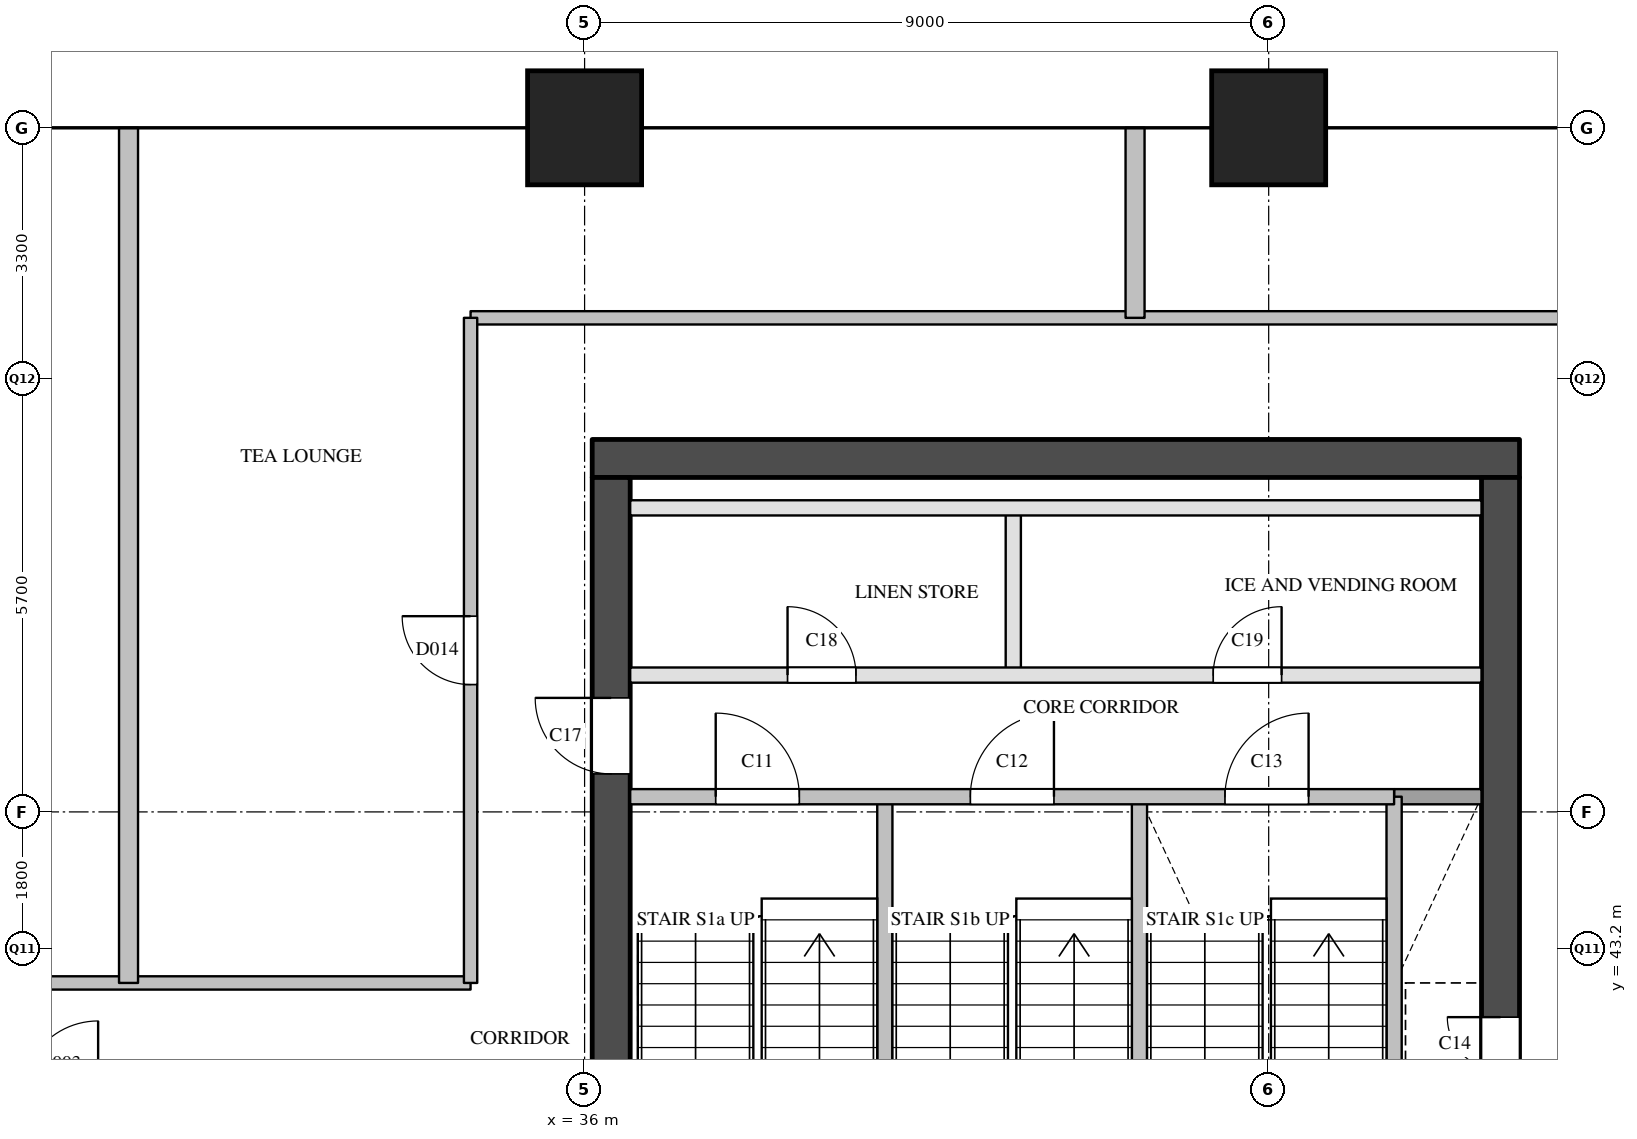
"""IFC4 building model, lengths in metres.
Left out: names, types, materials, properties, quantities, classifications, styles, units other than length and angle.
Written with IfcOpenShell. Run it as: python <this file> out.ifc"""

import sys

from ifc_helpers import new_model, si_unit, direction, frame, frame_2d, origin, origin_2d, place, context, subcontext, project, spatial, rectangle, extrude, element, fill, save


model = new_model("IFC4")
c1 = context("Model", 3, precision=1e-05, world=origin(), true_north=direction((0.0, 1.0)))
c2 = subcontext(c1, "Body", "Model", "MODEL_VIEW")
j1 = project(units=[si_unit("LENGTHUNIT", "METRE"), si_unit("PLANEANGLEUNIT", "RADIAN")], contexts=[c1])
p1 = place(None, origin())
s1 = spatial("IfcSite", under=j1, at=p1, CompositionType="ELEMENT")
p2 = place(p1, origin())
s2 = spatial("IfcBuilding", under=s1, at=p2, CompositionType="ELEMENT")
p3 = place(p2, frame((0.0, 0.0, 150.5)))
s3 = spatial("IfcBuildingStorey", under=s2, at=p3, CompositionType="ELEMENT", Elevation=150.5)
for number, where, z_axis, x_axis in (
    (1, (36.0, 54.0, 0.0), (0.0, 0.0, 1.0), (1.0, 0.0, 0.0)),
    (2, (45.0, 54.0, 0.0), (0.0, 0.0, 1.0), (1.0, 0.0, 0.0)),
):
    element("IfcColumn", number, at=place(p3, frame(where, z_axis=z_axis, x_axis=x_axis)), inside=s3, PredefinedType="COLUMN", context=c2, shape_type="SweptSolid", body=[
        extrude(rectangle(XDim=1.5, YDim=1.5, at=origin_2d()), origin(), (0.0, 0.0, 1.0), 3.9),
    ])
p4 = place(p3, frame((36.1, 49.65, 0.0), z_axis=(0.0, 0.0, 1.0), x_axis=(1.0, 0.0, 0.0)))
e3 = element("IfcWall", 3, at=p4, inside=s3, PredefinedType="SHEAR", context=c2, shape_type="SweptSolid", body=[
    extrude(rectangle(XDim=12.2, YDim=0.5, at=frame_2d((6.1, 0.0))), origin(), (0.0, 0.0, 1.0), 3.6),
])
p5 = place(p3, frame((36.35, 29.1, 0.0), z_axis=(0.0, 0.0, 1.0), x_axis=(0.0, 1.0, 0.0)))
e4 = element("IfcWall", 4, at=p5, inside=s3, PredefinedType="SHEAR", context=c2, shape_type="SweptSolid", body=[
    extrude(rectangle(XDim=20.3, YDim=0.5, at=frame_2d((10.15, 0.0))), origin(), (0.0, 0.0, 1.0), 3.6),
])
p6 = place(p5, frame((3.6, 0.0, 0.0)))
e5 = element("IfcOpeningElement", 5, at=p6, cuts=e4, PredefinedType="OPENING", context=c2, shape_type="SweptSolid", body=[
    extrude(rectangle(XDim=1.8, YDim=2.1, at=frame_2d((0.9, 1.05))), frame((0.0, 0.26, 0.0), z_axis=(0.0, -1.0, 0.0), x_axis=(1.0, 0.0, 0.0)), (0.0, 0.0, 1.0), 0.52),
])
p7 = place(p5, frame((16.4, 0.0, 0.0)))
e6 = element("IfcOpeningElement", 6, at=p7, cuts=e4, PredefinedType="OPENING", context=c2, shape_type="SweptSolid", body=[
    extrude(rectangle(XDim=1.0, YDim=2.1, at=frame_2d((0.5, 1.05))), frame((0.0, 0.26, 0.0), z_axis=(0.0, -1.0, 0.0), x_axis=(1.0, 0.0, 0.0)), (0.0, 0.0, 1.0), 0.52),
])
p8 = place(p3, frame((48.05, 29.1, 0.0), z_axis=(0.0, 0.0, 1.0), x_axis=(0.0, 1.0, 0.0)))
e7 = element("IfcWall", 7, at=p8, inside=s3, PredefinedType="SHEAR", context=c2, shape_type="SweptSolid", body=[
    extrude(rectangle(XDim=20.3, YDim=0.5, at=frame_2d((10.15, 0.0))), origin(), (0.0, 0.0, 1.0), 3.6),
])
p9 = place(p8, frame((12.5, 0.0, 0.0)))
e8 = element("IfcOpeningElement", 8, at=p9, cuts=e7, PredefinedType="OPENING", context=c2, shape_type="SweptSolid", body=[
    extrude(rectangle(XDim=0.7, YDim=2.1, at=frame_2d((0.35, 1.05))), frame((0.0, 0.26, 0.0), z_axis=(0.0, -1.0, 0.0), x_axis=(1.0, 0.0, 0.0)), (0.0, 0.0, 1.0), 0.52),
])
p10 = place(p8, frame((3.9, 0.0, 0.0)))
e9 = element("IfcOpeningElement", 9, at=p10, cuts=e7, PredefinedType="OPENING", context=c2, shape_type="SweptSolid", body=[
    extrude(rectangle(XDim=1.8, YDim=2.1, at=frame_2d((0.9, 1.05))), frame((0.0, 0.26, 0.0), z_axis=(0.0, -1.0, 0.0), x_axis=(1.0, 0.0, 0.0)), (0.0, 0.0, 1.0), 0.52),
])
p11 = place(p3, frame((39.95, 40.78, 0.0), z_axis=(0.0, 0.0, 1.0), x_axis=(0.0, 1.0, 0.0)))
e10 = element("IfcWall", 10, at=p11, inside=s3, PredefinedType="SOLIDWALL", context=c2, shape_type="SweptSolid", body=[
    extrude(rectangle(XDim=4.42, YDim=0.2, at=frame_2d((2.21, 0.0))), origin(), (0.0, 0.0, 1.0), 3.6),
])
p12 = place(p3, frame((41.64, 46.8, 0.0), z_axis=(0.0, 0.0, 1.0), x_axis=(0.0, 1.0, 0.0)))
e11 = element("IfcWall", 11, at=p12, inside=s3, PredefinedType="PARTITIONING", context=c2, shape_type="SweptSolid", body=[
    extrude(rectangle(XDim=2.2, YDim=0.2, at=frame_2d((1.1, 0.0))), origin(), (0.0, 0.0, 1.0), 3.6),
])
for number, where, z_axis, x_axis in (
    (12, (43.3, 40.78, 0.0), (0.0, 0.0, 1.0), (0.0, 1.0, 0.0)),
    (13, (46.65, 40.78, 0.0), (0.0, 0.0, 1.0), (0.0, 1.0, 0.0)),
):
    element("IfcWall", number, at=place(p3, frame(where, z_axis=z_axis, x_axis=x_axis)), inside=s3, PredefinedType="SOLIDWALL", context=c2, shape_type="SweptSolid", body=[
        extrude(rectangle(XDim=4.42, YDim=0.2, at=frame_2d((2.21, 0.0))), origin(), (0.0, 0.0, 1.0), 3.6),
    ])
p13 = place(p3, frame((46.65, 45.2, 0.0), z_axis=(0.0, 0.0, 1.0), x_axis=(1.0, 0.0, 0.0)))
e14 = element("IfcWall", 14, at=p13, inside=s3, PredefinedType="SOLIDWALL", context=c2, shape_type="SweptSolid", body=[
    extrude(rectangle(XDim=1.15, YDim=0.2, at=frame_2d((0.575, 0.0))), origin(), (0.0, 0.0, 1.0), 3.6),
])
p14 = place(p3, frame((36.6, 45.2, 0.0), z_axis=(0.0, 0.0, 1.0), x_axis=(1.0, 0.0, 0.0)))
e15 = element("IfcWall", 15, at=p14, inside=s3, PredefinedType="SOLIDWALL", context=c2, shape_type="SweptSolid", body=[
    extrude(rectangle(XDim=10.05, YDim=0.2, at=frame_2d((5.025, 0.0))), origin(), (0.0, 0.0, 1.0), 3.6),
])
p15 = place(p14, frame((1.125, 0.0, 0.0)))
e16 = element("IfcOpeningElement", 16, at=p15, cuts=e15, PredefinedType="OPENING", context=c2, shape_type="SweptSolid", body=[
    extrude(rectangle(XDim=1.1, YDim=2.1, at=frame_2d((0.55, 1.05))), frame((0.0, 0.11, 0.0), z_axis=(0.0, -1.0, 0.0), x_axis=(1.0, 0.0, 0.0)), (0.0, 0.0, 1.0), 0.22),
])
p16 = place(p14, frame((4.475, 0.0, 0.0)))
e17 = element("IfcOpeningElement", 17, at=p16, cuts=e15, PredefinedType="OPENING", context=c2, shape_type="SweptSolid", body=[
    extrude(rectangle(XDim=1.1, YDim=2.1, at=frame_2d((0.55, 1.05))), frame((0.0, 0.11, 0.0), z_axis=(0.0, -1.0, 0.0), x_axis=(1.0, 0.0, 0.0)), (0.0, 0.0, 1.0), 0.22),
])
p17 = place(p14, frame((7.825, 0.0, 0.0)))
e18 = element("IfcOpeningElement", 18, at=p17, cuts=e15, PredefinedType="OPENING", context=c2, shape_type="SweptSolid", body=[
    extrude(rectangle(XDim=1.1, YDim=2.1, at=frame_2d((0.55, 1.05))), frame((0.0, 0.11, 0.0), z_axis=(0.0, -1.0, 0.0), x_axis=(1.0, 0.0, 0.0)), (0.0, 0.0, 1.0), 0.22),
])
p18 = place(p3, frame((36.6, 46.8, 0.0), z_axis=(0.0, 0.0, 1.0), x_axis=(1.0, 0.0, 0.0)))
e19 = element("IfcWall", 19, at=p18, inside=s3, PredefinedType="PARTITIONING", context=c2, shape_type="SweptSolid", body=[
    extrude(rectangle(XDim=11.2, YDim=0.2, at=frame_2d((5.6, 0.0))), origin(), (0.0, 0.0, 1.0), 3.6),
])
p19 = place(p18, frame((2.07, 0.0, 0.0)))
e20 = element("IfcOpeningElement", 20, at=p19, cuts=e19, PredefinedType="OPENING", context=c2, shape_type="SweptSolid", body=[
    extrude(rectangle(XDim=0.9, YDim=2.1, at=frame_2d((0.45, 1.05))), frame((0.0, 0.11, 0.0), z_axis=(0.0, -1.0, 0.0), x_axis=(1.0, 0.0, 0.0)), (0.0, 0.0, 1.0), 0.22),
])
p20 = place(p18, frame((7.67, 0.0, 0.0)))
e21 = element("IfcOpeningElement", 21, at=p20, cuts=e19, PredefinedType="OPENING", context=c2, shape_type="SweptSolid", body=[
    extrude(rectangle(XDim=0.9, YDim=2.1, at=frame_2d((0.45, 1.05))), frame((0.0, 0.11, 0.0), z_axis=(0.0, -1.0, 0.0), x_axis=(1.0, 0.0, 0.0)), (0.0, 0.0, 1.0), 0.22),
])
p21 = place(p3, frame((36.6, 49.0, 0.0), z_axis=(0.0, 0.0, 1.0), x_axis=(1.0, 0.0, 0.0)))
e22 = element("IfcWall", 22, at=p21, inside=s3, PredefinedType="PARTITIONING", context=c2, shape_type="SweptSolid", body=[
    extrude(rectangle(XDim=11.2, YDim=0.2, at=frame_2d((5.6, 0.0))), origin(), (0.0, 0.0, 1.0), 3.6),
])
p22 = place(p3, frame((19.5, 42.75, 0.0), z_axis=(0.0, 0.0, 1.0), x_axis=(1.0, 0.0, 0.0)))
e23 = element("IfcWall", 23, at=p22, inside=s3, PredefinedType="PARTITIONING", context=c2, shape_type="SweptSolid", body=[
    extrude(rectangle(XDim=15.0, YDim=0.175, at=frame_2d((7.5, 0.0))), origin(), (0.0, 0.0, 1.0), 2.6),
])
p23 = place(p22, frame((4.8, 0.0, 0.0)))
e24 = element("IfcOpeningElement", 24, at=p23, cuts=e23, PredefinedType="OPENING", context=c2, shape_type="SweptSolid", body=[
    extrude(rectangle(XDim=0.9, YDim=2.1, at=frame_2d((0.45, 1.05))), frame((0.0, 0.097, 0.0), z_axis=(0.0, -1.0, 0.0), x_axis=(1.0, 0.0, 0.0)), (0.0, 0.0, 1.0), 0.195),
])
p24 = place(p3, frame((34.5, 51.5, 0.0), z_axis=(0.0, 0.0, 1.0), x_axis=(1.0, 0.0, 0.0)))
e25 = element("IfcWall", 25, at=p24, inside=s3, PredefinedType="PARTITIONING", context=c2, shape_type="SweptSolid", body=[
    extrude(rectangle(XDim=15.4, YDim=0.175, at=frame_2d((7.7, 0.0))), origin(), (0.0, 0.0, 1.0), 3.6),
])
p25 = place(p3, frame((34.5, 42.75, 0.0), z_axis=(0.0, 0.0, 1.0), x_axis=(0.0, 1.0, 0.0)))
e26 = element("IfcWall", 26, at=p25, inside=s3, PredefinedType="PARTITIONING", context=c2, shape_type="SweptSolid", body=[
    extrude(rectangle(XDim=8.75, YDim=0.175, at=frame_2d((4.375, 0.0))), origin(), (0.0, 0.0, 1.0), 3.6),
])
p26 = place(p25, frame((3.925, 0.0, 0.0)))
e27 = element("IfcOpeningElement", 27, at=p26, cuts=e26, PredefinedType="OPENING", context=c2, shape_type="SweptSolid", body=[
    extrude(rectangle(XDim=0.9, YDim=2.1, at=frame_2d((0.45, 1.05))), frame((0.0, 0.097, 0.0), z_axis=(0.0, -1.0, 0.0), x_axis=(1.0, 0.0, 0.0)), (0.0, 0.0, 1.0), 0.195),
])
p27 = place(p3, frame((30.0, 42.75, 0.0), z_axis=(0.0, 0.0, 1.0), x_axis=(0.0, 1.0, 0.0)))
e28 = element("IfcWall", 28, at=p27, inside=s3, PredefinedType="PARTITIONING", context=c2, shape_type="SweptSolid", body=[
    extrude(rectangle(XDim=11.25, YDim=0.25, at=frame_2d((5.625, 0.0))), origin(), (0.0, 0.0, 1.0), 2.6),
])
p28 = place(p3, frame((43.242, 51.5, 0.0), z_axis=(0.0, 0.0, 1.0), x_axis=(0.0, 1.0, 0.0)))
e29 = element("IfcWall", 29, at=p28, inside=s3, PredefinedType="PARTITIONING", context=c2, shape_type="SweptSolid", body=[
    extrude(rectangle(XDim=2.5, YDim=0.25, at=frame_2d((1.25, 0.0))), origin(), (0.0, 0.0, 1.0), 2.6),
])
p29 = place(p15, origin())
e30 = element("IfcDoor", 30, at=p29, inside=s3, OperationType="SINGLE_SWING_LEFT", PredefinedType="DOOR", context=c2, shape_type="SweptSolid", body=[
    extrude(rectangle(XDim=1.1, YDim=2.1, at=frame_2d((0.55, 1.05))), frame((0.0, 0.025, 0.0), z_axis=(0.0, -1.0, 0.0), x_axis=(1.0, 0.0, 0.0)), (0.0, 0.0, 1.0), 0.05),
])
fill(e16, e30)
p30 = place(p16, origin())
e31 = element("IfcDoor", 31, at=p30, inside=s3, OperationType="SINGLE_SWING_RIGHT", PredefinedType="DOOR", context=c2, shape_type="SweptSolid", body=[
    extrude(rectangle(XDim=1.1, YDim=2.1, at=frame_2d((0.55, 1.05))), frame((0.0, 0.025, 0.0), z_axis=(0.0, -1.0, 0.0), x_axis=(1.0, 0.0, 0.0)), (0.0, 0.0, 1.0), 0.05),
])
fill(e17, e31)
p31 = place(p17, origin())
e32 = element("IfcDoor", 32, at=p31, inside=s3, OperationType="SINGLE_SWING_RIGHT", PredefinedType="DOOR", context=c2, shape_type="SweptSolid", body=[
    extrude(rectangle(XDim=1.1, YDim=2.1, at=frame_2d((0.55, 1.05))), frame((0.0, 0.025, 0.0), z_axis=(0.0, -1.0, 0.0), x_axis=(1.0, 0.0, 0.0)), (0.0, 0.0, 1.0), 0.05),
])
fill(e18, e32)
p32 = place(p9, origin())
e33 = element("IfcDoor", 33, at=p32, inside=s3, OperationType="SINGLE_SWING_RIGHT", PredefinedType="DOOR", context=c2, shape_type="SweptSolid", body=[
    extrude(rectangle(XDim=0.7, YDim=2.1, at=frame_2d((0.35, 1.05))), frame((0.0, 0.025, 0.0), z_axis=(0.0, -1.0, 0.0), x_axis=(1.0, 0.0, 0.0)), (0.0, 0.0, 1.0), 0.05),
])
fill(e8, e33)
p33 = place(p7, origin())
e34 = element("IfcDoor", 34, at=p33, inside=s3, OperationType="SINGLE_SWING_RIGHT", PredefinedType="DOOR", context=c2, shape_type="SweptSolid", body=[
    extrude(rectangle(XDim=1.0, YDim=2.1, at=frame_2d((0.5, 1.05))), frame((0.0, 0.025, 0.0), z_axis=(0.0, -1.0, 0.0), x_axis=(1.0, 0.0, 0.0)), (0.0, 0.0, 1.0), 0.05),
])
fill(e6, e34)
p34 = place(p19, origin())
e35 = element("IfcDoor", 35, at=p34, inside=s3, OperationType="SINGLE_SWING_LEFT", PredefinedType="DOOR", context=c2, shape_type="SweptSolid", body=[
    extrude(rectangle(XDim=0.9, YDim=2.1, at=frame_2d((0.45, 1.05))), frame((0.0, 0.025, 0.0), z_axis=(0.0, -1.0, 0.0), x_axis=(1.0, 0.0, 0.0)), (0.0, 0.0, 1.0), 0.05),
])
fill(e20, e35)
p35 = place(p20, origin())
e36 = element("IfcDoor", 36, at=p35, inside=s3, OperationType="SINGLE_SWING_RIGHT", PredefinedType="DOOR", context=c2, shape_type="SweptSolid", body=[
    extrude(rectangle(XDim=0.9, YDim=2.1, at=frame_2d((0.45, 1.05))), frame((0.0, 0.025, 0.0), z_axis=(0.0, -1.0, 0.0), x_axis=(1.0, 0.0, 0.0)), (0.0, 0.0, 1.0), 0.05),
])
fill(e21, e36)
p36 = place(p26, origin())
e37 = element("IfcDoor", 37, at=p36, inside=s3, OperationType="SINGLE_SWING_RIGHT", PredefinedType="DOOR", context=c2, shape_type="SweptSolid", body=[
    extrude(rectangle(XDim=0.9, YDim=2.1, at=frame_2d((0.45, 1.05))), frame((0.0, 0.025, 0.0), z_axis=(0.0, -1.0, 0.0), x_axis=(1.0, 0.0, 0.0)), (0.0, 0.0, 1.0), 0.05),
])
fill(e27, e37)
save(model, sys.argv[1])
